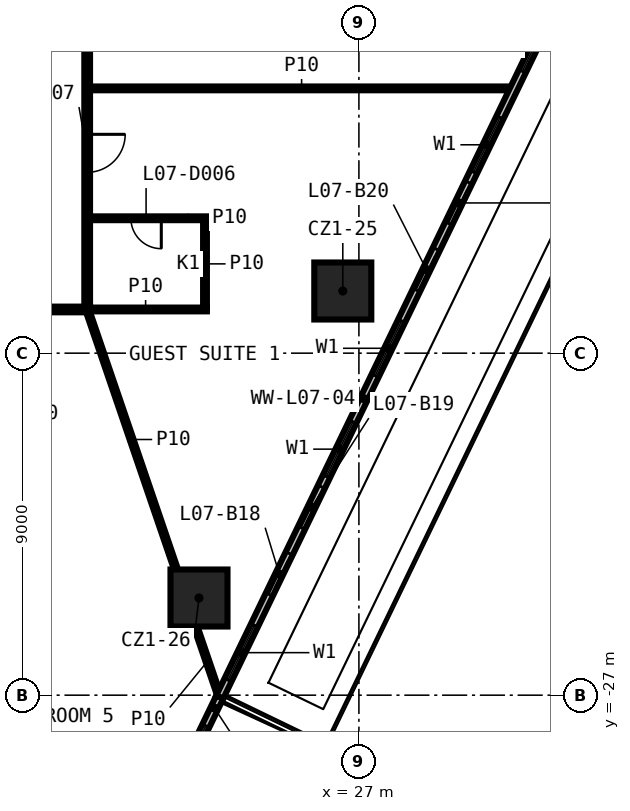
"""IFC4 building model, lengths in metres.
Left out: names, types, materials, properties, quantities, classifications, styles, units other than length and angle.
Written with IfcOpenShell. Run it as: python <this file> out.ifc"""

import sys

from ifc_helpers import new_model, si_unit, direction, frame, frame_2d, origin, origin_2d, place, context, subcontext, project, spatial, rectangle, extrude, element, fill, save


model = new_model("IFC4")
c1 = context("Model", 3, precision=1e-05, world=origin(), true_north=direction((0.0, 1.0)))
c2 = subcontext(c1, "Body", "Model", "MODEL_VIEW")
j1 = project(units=[si_unit("LENGTHUNIT", "METRE"), si_unit("PLANEANGLEUNIT", "RADIAN")], contexts=[c1])
p1 = place(None, origin())
s1 = spatial("IfcSite", under=j1, at=p1, CompositionType="ELEMENT")
p2 = place(p1, origin())
s2 = spatial("IfcBuilding", under=s1, at=p2, CompositionType="ELEMENT")
p3 = place(p2, frame((0.0, 0.0, 47.7)))
s3 = spatial("IfcBuildingStorey", under=s2, at=p3, CompositionType="ELEMENT", Elevation=47.7)
for number, where, z_axis, x_axis in (
    (1, (26.576, -16.364, 0.0), (0.0, 0.0, 1.0), (1.0, 0.0, 0.0)),
    (2, (22.792, -24.443, 0.0), (0.0, 0.0, 1.0), (1.0, 0.0, 0.0)),
):
    element("IfcColumn", number, at=place(p3, frame(where, z_axis=z_axis, x_axis=x_axis)), inside=s3, PredefinedType="COLUMN", context=c2, shape_type="SweptSolid", body=[
        extrude(rectangle(XDim=1.5, YDim=1.5, at=origin_2d()), origin(), (0.0, 0.0, 1.0), 3.3),
    ])
p4 = place(p3, frame((19.925, -16.85, 0.0), z_axis=(0.0, 0.0, 1.0), x_axis=(-1.0, 0.0, 0.0)))
e3 = element("IfcWall", 3, at=p4, inside=s3, PredefinedType="PARTITIONING", context=c2, shape_type="SweptSolid", body=[
    extrude(rectangle(XDim=39.85, YDim=0.15, at=frame_2d((19.925, 0.0))), origin(), (0.0, 0.0, 1.0), 3.3),
])
p5 = place(p4, frame((31.008, 0.0, 0.0)))
e4 = element("IfcOpeningElement", 4, at=p5, cuts=e3, PredefinedType="OPENING", context=c2, shape_type="SweptSolid", body=[
    extrude(rectangle(XDim=0.9, YDim=2.1, at=frame_2d((0.45, 1.05))), frame((0.0, 0.085, 0.0), z_axis=(0.0, -1.0, 0.0), x_axis=(1.0, 0.0, 0.0)), (0.0, 0.0, 1.0), 0.17),
])
p6 = place(p4, frame((22.704, 0.0, 0.0)))
e5 = element("IfcOpeningElement", 5, at=p6, cuts=e3, PredefinedType="OPENING", context=c2, shape_type="SweptSolid", body=[
    extrude(rectangle(XDim=0.9, YDim=2.1, at=frame_2d((0.45, 1.05))), frame((0.0, 0.085, 0.0), z_axis=(0.0, -1.0, 0.0), x_axis=(1.0, 0.0, 0.0)), (0.0, 0.0, 1.0), 0.17),
])
p7 = place(p4, frame((3.888, 0.0, 0.0)))
e6 = element("IfcOpeningElement", 6, at=p7, cuts=e3, PredefinedType="OPENING", context=c2, shape_type="SweptSolid", body=[
    extrude(rectangle(XDim=0.9, YDim=2.1, at=frame_2d((0.45, 1.05))), frame((0.0, 0.085, 0.0), z_axis=(0.0, -1.0, 0.0), x_axis=(1.0, 0.0, 0.0)), (0.0, 0.0, 1.0), 0.17),
])
p8 = place(p3, frame((19.775, -16.85, 0.0), z_axis=(0.0, 0.0, 1.0), x_axis=(1.0, 0.0, 0.0)))
e7 = element("IfcWall", 7, at=p8, inside=s3, PredefinedType="PARTITIONING", context=c2, shape_type="SweptSolid", body=[
    extrude(rectangle(XDim=3.225, YDim=0.1, at=frame_2d((1.613, 0.0))), origin(), (0.0, 0.0, 1.0), 3.3),
])
p9 = place(p3, frame((23.0, -14.45, 0.0), z_axis=(0.0, 0.0, 1.0), x_axis=(-1.0, 0.0, 0.0)))
e8 = element("IfcWall", 8, at=p9, inside=s3, PredefinedType="PARTITIONING", context=c2, shape_type="SweptSolid", body=[
    extrude(rectangle(XDim=3.075, YDim=0.1, at=frame_2d((1.538, 0.0))), origin(), (0.0, 0.0, 1.0), 3.3),
])
p10 = place(p9, frame((1.2, 0.0, 0.0)))
e9 = element("IfcOpeningElement", 9, at=p10, cuts=e8, PredefinedType="OPENING", context=c2, shape_type="SweptSolid", body=[
    extrude(rectangle(XDim=0.8, YDim=2.1, at=frame_2d((0.4, 1.05))), frame((0.0, 0.06, 0.0), z_axis=(0.0, -1.0, 0.0), x_axis=(1.0, 0.0, 0.0)), (0.0, 0.0, 1.0), 0.12),
])
p11 = place(p3, frame((19.925, -11.032, 0.0), z_axis=(0.0, 0.0, 1.0), x_axis=(1.0, 0.0, 0.0)))
e10 = element("IfcWall", 10, at=p11, inside=s3, PredefinedType="PARTITIONING", context=c2, shape_type="SweptSolid", body=[
    extrude(rectangle(XDim=11.135, YDim=0.1, at=frame_2d((5.567, 0.0))), origin(), (0.0, 0.0, 1.0), 3.3),
])
p12 = place(p3, frame((22.95, -16.8, 0.0), z_axis=(0.0, 0.0, 1.0), x_axis=(0.0, 1.0, 0.0)))
e11 = element("IfcWall", 11, at=p12, inside=s3, PredefinedType="PARTITIONING", context=c2, shape_type="SweptSolid", body=[
    extrude(rectangle(XDim=2.3, YDim=0.1, at=frame_2d((1.15, 0.0))), origin(), (0.0, 0.0, 1.0), 3.3),
])
p13 = place(p3, frame((19.85, 16.775, 0.0), z_axis=(0.0, 0.0, 1.0), x_axis=(0.0, -1.0, 0.0)))
e12 = element("IfcWall", 12, at=p13, inside=s3, PredefinedType="PARTITIONING", context=c2, shape_type="SweptSolid", body=[
    extrude(rectangle(XDim=33.55, YDim=0.15, at=frame_2d((16.775, 0.0))), origin(), (0.0, 0.0, 1.0), 3.3),
])
p14 = place(p13, frame((29.016, 0.0, 0.0)))
e13 = element("IfcOpeningElement", 13, at=p14, cuts=e12, PredefinedType="OPENING", context=c2, shape_type="SweptSolid", body=[
    extrude(rectangle(XDim=1.0, YDim=2.1, at=frame_2d((0.5, 1.05))), frame((0.0, 0.085, 0.0), z_axis=(0.0, -1.0, 0.0), x_axis=(1.0, 0.0, 0.0)), (0.0, 0.0, 1.0), 0.17),
])
p15 = place(p13, frame((20.1, 0.0, 0.0)))
e14 = element("IfcOpeningElement", 14, at=p15, cuts=e12, PredefinedType="OPENING", context=c2, shape_type="SweptSolid", body=[
    extrude(rectangle(XDim=1.0, YDim=2.1, at=frame_2d((0.5, 1.05))), frame((0.0, 0.085, 0.0), z_axis=(0.0, -1.0, 0.0), x_axis=(1.0, 0.0, 0.0)), (0.0, 0.0, 1.0), 0.17),
])
p16 = place(p13, frame((18.446, 0.0, 0.0)))
e15 = element("IfcOpeningElement", 15, at=p16, cuts=e12, PredefinedType="OPENING", context=c2, shape_type="SweptSolid", body=[
    extrude(rectangle(XDim=1.0, YDim=2.1, at=frame_2d((0.5, 1.05))), frame((0.0, 0.085, 0.0), z_axis=(0.0, -1.0, 0.0), x_axis=(1.0, 0.0, 0.0)), (0.0, 0.0, 1.0), 0.17),
])
p17 = place(p13, frame((4.143, 0.0, 0.0)))
e16 = element("IfcOpeningElement", 16, at=p17, cuts=e12, PredefinedType="OPENING", context=c2, shape_type="SweptSolid", body=[
    extrude(rectangle(XDim=0.9, YDim=2.1, at=frame_2d((0.45, 1.05))), frame((0.0, 0.085, 0.0), z_axis=(0.0, -1.0, 0.0), x_axis=(1.0, 0.0, 0.0)), (0.0, 0.0, 1.0), 0.17),
])
p18 = place(p3, frame((19.85, -16.85, 0.0), z_axis=(0.0, 0.0, 1.0), x_axis=(0.323389409091, -0.94626597217, 0.0)))
e17 = element("IfcWall", 17, at=p18, inside=s3, PredefinedType="PARTITIONING", context=c2, shape_type="SweptSolid", body=[
    extrude(rectangle(XDim=7.232, YDim=0.1, at=frame_2d((3.616, 0.0))), origin(), (0.0, 0.0, 1.0), 3.3),
])
p19 = place(p3, frame((22.701, -25.193, 0.0), z_axis=(0.0, 0.0, 1.0), x_axis=(0.323521274284, -0.94622089656, 0.0)))
e18 = element("IfcWall", 18, at=p19, inside=s3, PredefinedType="PARTITIONING", context=c2, shape_type="SweptSolid", body=[
    extrude(rectangle(XDim=1.936, YDim=0.1, at=frame_2d((0.968, 0.0))), origin(), (0.0, 0.0, 1.0), 3.3),
])
p20 = place(p3, frame((23.338, -27.051, 0.0), z_axis=(0.0, 0.0, 1.0), x_axis=(0.43524886879, 0.900310181114, 0.0)))
e19 = element("IfcWall", 19, at=p20, inside=s3, PredefinedType="SOLIDWALL", context=c2, shape_type="SweptSolid", body=[
    extrude(rectangle(XDim=26.689, YDim=0.2, at=frame_2d((13.344, 0.0))), origin(), (0.0, 0.0, 1.0), 3.3),
])
p21 = place(p20, frame((0.5, 0.0, 0.6)))
e20 = element("IfcOpeningElement", 20, at=p21, cuts=e19, PredefinedType="OPENING", context=c2, shape_type="SweptSolid", body=[
    extrude(rectangle(XDim=1.6, YDim=2.4, at=frame_2d((0.8, 1.2))), frame((0.0, 0.11, 0.0), z_axis=(0.0, -1.0, 0.0), x_axis=(1.0, 0.0, 0.0)), (0.0, 0.0, 1.0), 0.22),
])
p22 = place(p20, frame((3.0, 0.0, 0.0)))
e21 = element("IfcOpeningElement", 21, at=p22, cuts=e19, PredefinedType="OPENING", context=c2, shape_type="SweptSolid", body=[
    extrude(rectangle(XDim=1.2, YDim=2.4, at=frame_2d((0.6, 1.2))), frame((0.0, 0.11, 0.0), z_axis=(0.0, -1.0, 0.0), x_axis=(1.0, 0.0, 0.0)), (0.0, 0.0, 1.0), 0.22),
])
p23 = place(p20, frame((6.448, 0.0, 0.6)))
e22 = element("IfcOpeningElement", 22, at=p23, cuts=e19, PredefinedType="OPENING", context=c2, shape_type="SweptSolid", body=[
    extrude(rectangle(XDim=1.6, YDim=2.4, at=frame_2d((0.8, 1.2))), frame((0.0, 0.11, 0.0), z_axis=(0.0, -1.0, 0.0), x_axis=(1.0, 0.0, 0.0)), (0.0, 0.0, 1.0), 0.22),
])
p24 = place(p20, frame((4.948, 0.0, 0.0)))
e23 = element("IfcOpeningElement", 23, at=p24, cuts=e19, PredefinedType="OPENING", context=c2, shape_type="SweptSolid", body=[
    extrude(rectangle(XDim=1.2, YDim=2.4, at=frame_2d((0.6, 1.2))), frame((0.0, 0.11, 0.0), z_axis=(0.0, -1.0, 0.0), x_axis=(1.0, 0.0, 0.0)), (0.0, 0.0, 1.0), 0.22),
])
p25 = place(p20, frame((9.396, 0.0, 0.6)))
e24 = element("IfcOpeningElement", 24, at=p25, cuts=e19, PredefinedType="OPENING", context=c2, shape_type="SweptSolid", body=[
    extrude(rectangle(XDim=1.6, YDim=2.4, at=frame_2d((0.8, 1.2))), frame((0.0, 0.11, 0.0), z_axis=(0.0, -1.0, 0.0), x_axis=(1.0, 0.0, 0.0)), (0.0, 0.0, 1.0), 0.22),
])
p26 = place(p20, frame((11.896, 0.0, 0.0)))
e25 = element("IfcOpeningElement", 25, at=p26, cuts=e19, PredefinedType="OPENING", context=c2, shape_type="SweptSolid", body=[
    extrude(rectangle(XDim=1.2, YDim=2.4, at=frame_2d((0.6, 1.2))), frame((0.0, 0.11, 0.0), z_axis=(0.0, -1.0, 0.0), x_axis=(1.0, 0.0, 0.0)), (0.0, 0.0, 1.0), 0.22),
])
p27 = place(p20, frame((15.344, 0.0, 0.6)))
e26 = element("IfcOpeningElement", 26, at=p27, cuts=e19, PredefinedType="OPENING", context=c2, shape_type="SweptSolid", body=[
    extrude(rectangle(XDim=1.6, YDim=2.4, at=frame_2d((0.8, 1.2))), frame((0.0, 0.11, 0.0), z_axis=(0.0, -1.0, 0.0), x_axis=(1.0, 0.0, 0.0)), (0.0, 0.0, 1.0), 0.22),
])
p28 = place(p20, frame((13.844, 0.0, 0.0)))
e27 = element("IfcOpeningElement", 27, at=p28, cuts=e19, PredefinedType="OPENING", context=c2, shape_type="SweptSolid", body=[
    extrude(rectangle(XDim=1.2, YDim=2.4, at=frame_2d((0.6, 1.2))), frame((0.0, 0.11, 0.0), z_axis=(0.0, -1.0, 0.0), x_axis=(1.0, 0.0, 0.0)), (0.0, 0.0, 1.0), 0.22),
])
p29 = place(p20, frame((18.292, 0.0, 0.6)))
e28 = element("IfcOpeningElement", 28, at=p29, cuts=e19, PredefinedType="OPENING", context=c2, shape_type="SweptSolid", body=[
    extrude(rectangle(XDim=1.6, YDim=2.4, at=frame_2d((0.8, 1.2))), frame((0.0, 0.11, 0.0), z_axis=(0.0, -1.0, 0.0), x_axis=(1.0, 0.0, 0.0)), (0.0, 0.0, 1.0), 0.22),
])
p30 = place(p20, frame((20.692, 0.0, 0.0)))
e29 = element("IfcOpeningElement", 29, at=p30, cuts=e19, PredefinedType="OPENING", context=c2, shape_type="SweptSolid", body=[
    extrude(rectangle(XDim=1.2, YDim=2.4, at=frame_2d((0.6, 1.2))), frame((0.0, 0.11, 0.0), z_axis=(0.0, -1.0, 0.0), x_axis=(1.0, 0.0, 0.0)), (0.0, 0.0, 1.0), 0.22),
])
p31 = place(p20, frame((24.24, 0.0, 0.6)))
e30 = element("IfcOpeningElement", 30, at=p31, cuts=e19, PredefinedType="OPENING", context=c2, shape_type="SweptSolid", body=[
    extrude(rectangle(XDim=1.6, YDim=2.4, at=frame_2d((0.8, 1.2))), frame((0.0, 0.11, 0.0), z_axis=(0.0, -1.0, 0.0), x_axis=(1.0, 0.0, 0.0)), (0.0, 0.0, 1.0), 0.22),
])
p32 = place(p20, frame((22.74, 0.0, 0.0)))
e31 = element("IfcOpeningElement", 31, at=p32, cuts=e19, PredefinedType="OPENING", context=c2, shape_type="SweptSolid", body=[
    extrude(rectangle(XDim=1.2, YDim=2.4, at=frame_2d((0.6, 1.2))), frame((0.0, 0.11, 0.0), z_axis=(0.0, -1.0, 0.0), x_axis=(1.0, 0.0, 0.0)), (0.0, 0.0, 1.0), 0.22),
])
p33 = place(p3, frame((21.406, -31.048, 0.0), z_axis=(0.0, 0.0, 1.0), x_axis=(0.435227364278, 0.900320577008, 0.0)))
e32 = element("IfcWall", 32, at=p33, inside=s3, PredefinedType="SOLIDWALL", context=c2, shape_type="SweptSolid", body=[
    extrude(rectangle(XDim=4.439, YDim=0.2, at=frame_2d((2.219, 0.0))), origin(), (0.0, 0.0, 1.0), 3.3),
])
p34 = place(p33, frame((2.0, 0.0, 0.6)))
e33 = element("IfcOpeningElement", 33, at=p34, cuts=e32, PredefinedType="OPENING", context=c2, shape_type="SweptSolid", body=[
    extrude(rectangle(XDim=1.6, YDim=2.4, at=frame_2d((0.8, 1.2))), frame((0.0, 0.11, 0.0), z_axis=(0.0, -1.0, 0.0), x_axis=(1.0, 0.0, 0.0)), (0.0, 0.0, 1.0), 0.22),
])
p35 = place(p33, frame((0.5, 0.0, 0.0)))
e34 = element("IfcOpeningElement", 34, at=p35, cuts=e32, PredefinedType="OPENING", context=c2, shape_type="SweptSolid", body=[
    extrude(rectangle(XDim=1.2, YDim=2.4, at=frame_2d((0.6, 1.2))), frame((0.0, 0.11, 0.0), z_axis=(0.0, -1.0, 0.0), x_axis=(1.0, 0.0, 0.0)), (0.0, 0.0, 1.0), 0.22),
])
p36 = place(p10, origin())
e35 = element("IfcDoor", 35, at=p36, inside=s3, OperationType="SINGLE_SWING_LEFT", PredefinedType="DOOR", context=c2, shape_type="SweptSolid", body=[
    extrude(rectangle(XDim=0.8, YDim=2.1, at=frame_2d((0.4, 1.05))), frame((0.0, 0.025, 0.0), z_axis=(0.0, -1.0, 0.0), x_axis=(1.0, 0.0, 0.0)), (0.0, 0.0, 1.0), 0.05),
])
fill(e9, e35)
p37 = place(p14, origin())
e36 = element("IfcDoor", 36, at=p37, inside=s3, OperationType="SINGLE_SWING_RIGHT", PredefinedType="DOOR", context=c2, shape_type="SweptSolid", body=[
    extrude(rectangle(XDim=1.0, YDim=2.1, at=frame_2d((0.5, 1.05))), frame((0.0, 0.025, 0.0), z_axis=(0.0, -1.0, 0.0), x_axis=(1.0, 0.0, 0.0)), (0.0, 0.0, 1.0), 0.05),
])
fill(e13, e36)
p38 = place(p21, origin())
e37 = element("IfcWindow", 37, at=p38, inside=s3, PartitioningType="SINGLE_PANEL", PredefinedType="WINDOW", context=c2, shape_type="SweptSolid", body=[
    extrude(rectangle(XDim=1.6, YDim=2.4, at=frame_2d((0.8, 1.2))), frame((0.0, 0.03, 0.0), z_axis=(0.0, -1.0, 0.0), x_axis=(1.0, 0.0, 0.0)), (0.0, 0.0, 1.0), 0.06),
])
fill(e20, e37)
p39 = place(p22, origin())
e38 = element("IfcDoor", 38, at=p39, inside=s3, OperationType="SLIDING_TO_LEFT", PredefinedType="DOOR", context=c2, shape_type="SweptSolid", body=[
    extrude(rectangle(XDim=1.2, YDim=2.4, at=frame_2d((0.6, 1.2))), frame((0.0, 0.025, 0.0), z_axis=(0.0, -1.0, 0.0), x_axis=(1.0, 0.0, 0.0)), (0.0, 0.0, 1.0), 0.05),
])
fill(e21, e38)
p40 = place(p23, origin())
e39 = element("IfcWindow", 39, at=p40, inside=s3, PartitioningType="SINGLE_PANEL", PredefinedType="WINDOW", context=c2, shape_type="SweptSolid", body=[
    extrude(rectangle(XDim=1.6, YDim=2.4, at=frame_2d((0.8, 1.2))), frame((0.0, 0.03, 0.0), z_axis=(0.0, -1.0, 0.0), x_axis=(1.0, 0.0, 0.0)), (0.0, 0.0, 1.0), 0.06),
])
fill(e22, e39)
p41 = place(p24, origin())
e40 = element("IfcDoor", 40, at=p41, inside=s3, OperationType="SLIDING_TO_LEFT", PredefinedType="DOOR", context=c2, shape_type="SweptSolid", body=[
    extrude(rectangle(XDim=1.2, YDim=2.4, at=frame_2d((0.6, 1.2))), frame((0.0, 0.025, 0.0), z_axis=(0.0, -1.0, 0.0), x_axis=(1.0, 0.0, 0.0)), (0.0, 0.0, 1.0), 0.05),
])
fill(e23, e40)
p42 = place(p25, origin())
e41 = element("IfcWindow", 41, at=p42, inside=s3, PartitioningType="SINGLE_PANEL", PredefinedType="WINDOW", context=c2, shape_type="SweptSolid", body=[
    extrude(rectangle(XDim=1.6, YDim=2.4, at=frame_2d((0.8, 1.2))), frame((0.0, 0.03, 0.0), z_axis=(0.0, -1.0, 0.0), x_axis=(1.0, 0.0, 0.0)), (0.0, 0.0, 1.0), 0.06),
])
fill(e24, e41)
p43 = place(p26, origin())
e42 = element("IfcDoor", 42, at=p43, inside=s3, OperationType="SLIDING_TO_LEFT", PredefinedType="DOOR", context=c2, shape_type="SweptSolid", body=[
    extrude(rectangle(XDim=1.2, YDim=2.4, at=frame_2d((0.6, 1.2))), frame((0.0, 0.025, 0.0), z_axis=(0.0, -1.0, 0.0), x_axis=(1.0, 0.0, 0.0)), (0.0, 0.0, 1.0), 0.05),
])
fill(e25, e42)
p44 = place(p27, origin())
e43 = element("IfcWindow", 43, at=p44, inside=s3, PartitioningType="SINGLE_PANEL", PredefinedType="WINDOW", context=c2, shape_type="SweptSolid", body=[
    extrude(rectangle(XDim=1.6, YDim=2.4, at=frame_2d((0.8, 1.2))), frame((0.0, 0.03, 0.0), z_axis=(0.0, -1.0, 0.0), x_axis=(1.0, 0.0, 0.0)), (0.0, 0.0, 1.0), 0.06),
])
fill(e26, e43)
p45 = place(p28, origin())
e44 = element("IfcDoor", 44, at=p45, inside=s3, OperationType="SLIDING_TO_LEFT", PredefinedType="DOOR", context=c2, shape_type="SweptSolid", body=[
    extrude(rectangle(XDim=1.2, YDim=2.4, at=frame_2d((0.6, 1.2))), frame((0.0, 0.025, 0.0), z_axis=(0.0, -1.0, 0.0), x_axis=(1.0, 0.0, 0.0)), (0.0, 0.0, 1.0), 0.05),
])
fill(e27, e44)
p46 = place(p29, origin())
e45 = element("IfcWindow", 45, at=p46, inside=s3, PartitioningType="SINGLE_PANEL", PredefinedType="WINDOW", context=c2, shape_type="SweptSolid", body=[
    extrude(rectangle(XDim=1.6, YDim=2.4, at=frame_2d((0.8, 1.2))), frame((0.0, 0.03, 0.0), z_axis=(0.0, -1.0, 0.0), x_axis=(1.0, 0.0, 0.0)), (0.0, 0.0, 1.0), 0.06),
])
fill(e28, e45)
p47 = place(p34, origin())
e46 = element("IfcWindow", 46, at=p47, inside=s3, PartitioningType="SINGLE_PANEL", PredefinedType="WINDOW", context=c2, shape_type="SweptSolid", body=[
    extrude(rectangle(XDim=1.6, YDim=2.4, at=frame_2d((0.8, 1.2))), frame((0.0, 0.03, 0.0), z_axis=(0.0, -1.0, 0.0), x_axis=(1.0, 0.0, 0.0)), (0.0, 0.0, 1.0), 0.06),
])
fill(e33, e46)
save(model, sys.argv[1])
